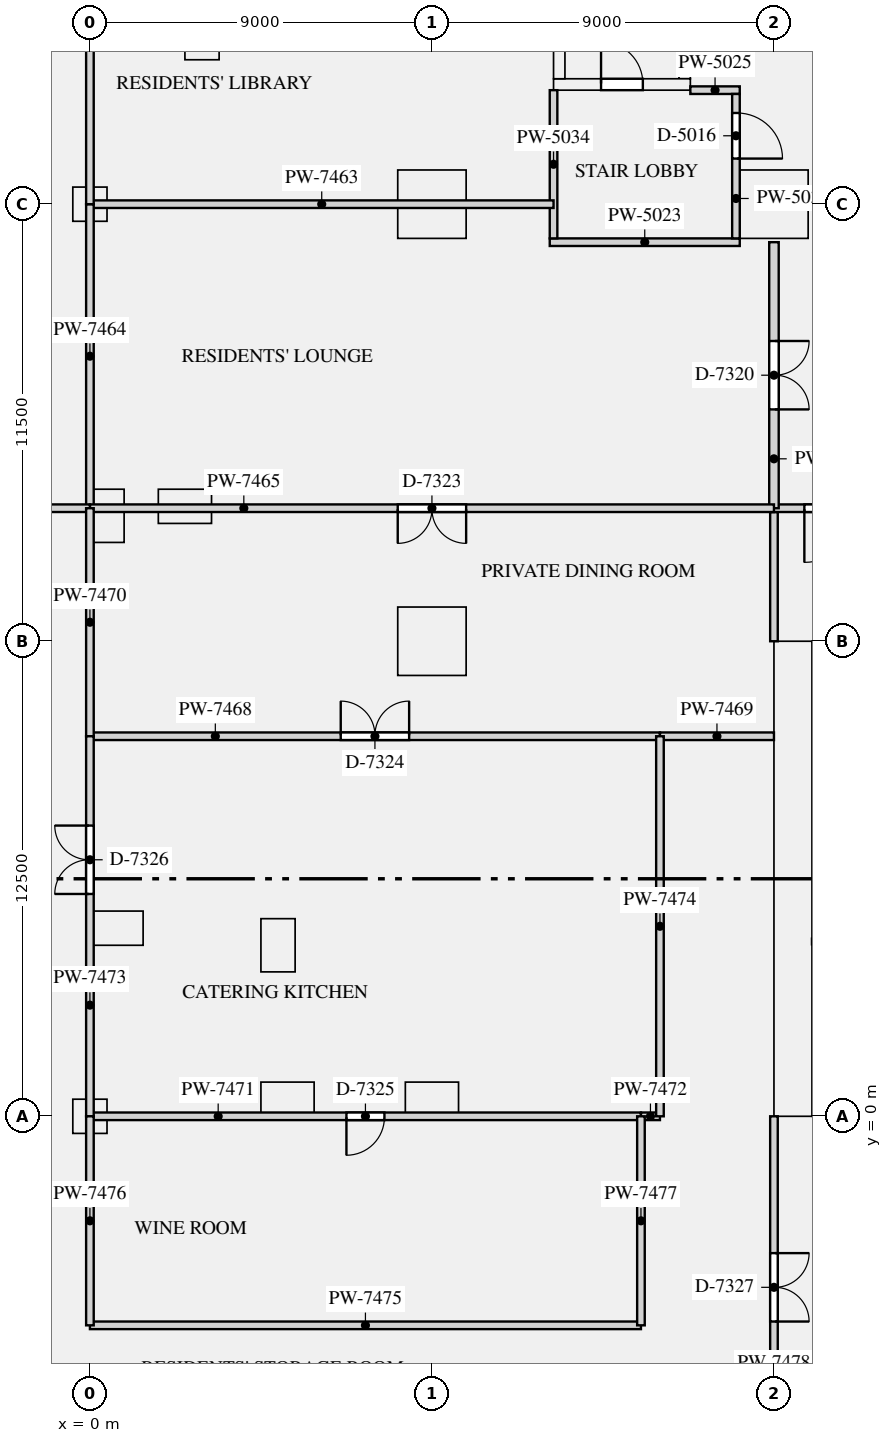
"""IFC4 building model, lengths in metres.
Left out: names, types, materials, properties, quantities, classifications, styles, units other than length and angle.
Written with IfcOpenShell. Run it as: python <this file> out.ifc"""

import sys

from ifc_helpers import new_model, si_unit, direction, frame, frame_2d, origin, origin_with_axes, origin_2d, place, context, subcontext, project, spatial, rectangle, extrude, element, fill, save


model = new_model("IFC4")
c1 = context("Model", 3, precision=1e-05, world=origin(), true_north=direction((0.0, 1.0)))
c2 = subcontext(c1, "Body", "Model", "MODEL_VIEW")
j1 = project(units=[si_unit("LENGTHUNIT", "METRE"), si_unit("PLANEANGLEUNIT", "RADIAN")], contexts=[c1])
p1 = place(None, origin())
s1 = spatial("IfcSite", under=j1, at=p1, CompositionType="ELEMENT")
p2 = place(p1, origin())
s2 = spatial("IfcBuilding", under=s1, at=p2, CompositionType="ELEMENT")
p3 = place(p2, frame((0.0, 0.0, 6.5)))
s3 = spatial("IfcBuildingStorey", under=s2, at=p3, CompositionType="ELEMENT", Elevation=6.5)
for number, where, z_axis, x_axis in (
    (1, (9.0, 0.45, 0.0), (0.0, 0.0, 1.0), (1.0, 0.0, 0.0)),
    (2, (2.95, 28.5, 0.0), (0.0, 0.0, 1.0), (0.0, -1.0, 0.0)),
    (3, (2.5, 16.05, 0.0), (0.0, 0.0, 1.0), (-1.0, 0.0, 0.0)),
    (4, (0.45, 15.8, 0.0), (0.0, 0.0, 1.0), (0.0, -1.0, 0.0)),
    (5, (0.7, 4.95, 0.0), (0.0, 0.0, 1.0), (1.0, 0.0, 0.0)),
    (6, (4.95, 4.5, 0.0), (0.0, 0.0, 1.0), (0.0, -1.0, 0.0)),
    (7, (5.2, 0.45, 0.0), (0.0, 0.0, 1.0), (1.0, 0.0, 0.0)),
):
    element("IfcColumn", number, at=place(p3, frame(where, z_axis=z_axis, x_axis=x_axis)), inside=s3, PredefinedType="USERDEFINED", context=c2, shape_type="SweptSolid", body=[
        extrude(rectangle(XDim=1.4, YDim=0.9, at=origin_2d()), origin(), (0.0, 0.0, 1.0), 4.5),
    ])
for number, where, z_axis, x_axis in (
    (8, (0.0, 0.0, 0.0), (0.0, 0.0, 1.0), (1.0, 0.0, 0.0)),
    (9, (0.0, 24.0, 0.0), (0.0, 0.0, 1.0), (1.0, 0.0, 0.0)),
):
    element("IfcColumn", number, at=place(p3, frame(where, z_axis=z_axis, x_axis=x_axis)), inside=s3, PredefinedType="COLUMN", context=c2, shape_type="SweptSolid", body=[
        extrude(rectangle(XDim=0.9, YDim=0.9, at=origin_2d()), origin(), (0.0, 0.0, 1.0), 4.5),
    ])
for number, where, z_axis, x_axis in (
    (10, (9.0, 12.5, 0.0), (0.0, 0.0, 1.0), (1.0, 0.0, 0.0)),
    (11, (9.0, 24.0, 0.0), (0.0, 0.0, 1.0), (1.0, 0.0, 0.0)),
    (12, (18.0, 24.0, 0.0), (0.0, 0.0, 1.0), (1.0, 0.0, 0.0)),
):
    element("IfcColumn", number, at=place(p3, frame(where, z_axis=z_axis, x_axis=x_axis)), inside=s3, PredefinedType="COLUMN", context=c2, shape_type="SweptSolid", body=[
        extrude(rectangle(XDim=1.8, YDim=1.8, at=origin_2d()), origin(), (0.0, 0.0, 1.0), 4.5),
    ])
p4 = place(p3, frame((18.5, 0.0, 0.0), z_axis=(0.0, 0.0, 1.0), x_axis=(0.0, 1.0, 0.0)))
e13 = element("IfcWall", 13, at=p4, inside=s3, PredefinedType="SHEAR", context=c2, shape_type="SweptSolid", body=[
    extrude(rectangle(XDim=12.5, YDim=1.0, at=frame_2d((6.25, 0.0))), origin(), (0.0, 0.0, 1.0), 4.5),
])
p5 = place(p3, frame((12.2, 27.15, 0.0), z_axis=(0.0, 0.0, 1.0), x_axis=(1.0, 0.0, 0.0)))
e14 = element("IfcWall", 14, at=p5, inside=s3, PredefinedType="SHEAR", context=c2, shape_type="SweptSolid", body=[
    extrude(rectangle(XDim=3.6, YDim=0.3, at=frame_2d((1.8, 0.0))), origin(), (0.0, 0.0, 1.0), 4.5),
])
p6 = place(p5, frame((1.25, 0.0, 0.0)))
e15 = element("IfcOpeningElement", 15, at=p6, cuts=e14, PredefinedType="OPENING", context=c2, shape_type="SweptSolid", body=[
    extrude(rectangle(XDim=1.1, YDim=2.1, at=frame_2d((0.55, 1.05))), frame((0.0, 0.16, 0.0), z_axis=(0.0, -1.0, 0.0), x_axis=(1.0, 0.0, 0.0)), (0.0, 0.0, 1.0), 0.32),
])
for number, where, z_axis, x_axis in (
    (16, (12.35, 27.3, 0.0), (0.0, 0.0, 1.0), (0.0, 1.0, 0.0)),
    (17, (15.65, 27.3, 0.0), (0.0, 0.0, 1.0), (0.0, 1.0, 0.0)),
):
    element("IfcWall", number, at=place(p3, frame(where, z_axis=z_axis, x_axis=x_axis)), inside=s3, PredefinedType="SHEAR", context=c2, shape_type="SweptSolid", body=[
        extrude(rectangle(XDim=7.8, YDim=0.3, at=frame_2d((3.9, 0.0))), origin(), (0.0, 0.0, 1.0), 4.5),
    ])
p7 = place(p3, frame((19.0, 4.6, 0.0), z_axis=(0.0, 0.0, 1.0), x_axis=(1.0, 0.0, 0.0)))
e18 = element("IfcWall", 18, at=p7, inside=s3, PredefinedType="PARTITIONING", context=c2, shape_type="SweptSolid", body=[
    extrude(rectangle(XDim=8.3, YDim=0.15, at=frame_2d((4.15, 0.0))), origin(), (0.0, 0.0, 1.0), 4.098),
])
p8 = place(p7, frame((0.45, 0.0, 0.0)))
e19 = element("IfcOpeningElement", 19, at=p8, cuts=e18, PredefinedType="OPENING", context=c2, shape_type="SweptSolid", body=[
    extrude(rectangle(XDim=0.9, YDim=2.1, at=frame_2d((0.45, 1.05))), frame((0.0, 0.085, 0.0), z_axis=(0.0, -1.0, 0.0), x_axis=(1.0, 0.0, 0.0)), (0.0, 0.0, 1.0), 0.17),
])
p9 = place(p7, frame((5.85, 0.0, 0.0)))
e20 = element("IfcOpeningElement", 20, at=p9, cuts=e18, PredefinedType="OPENING", context=c2, shape_type="SweptSolid", body=[
    extrude(rectangle(XDim=0.9, YDim=2.1, at=frame_2d((0.45, 1.05))), frame((0.0, 0.085, 0.0), z_axis=(0.0, -1.0, 0.0), x_axis=(1.0, 0.0, 0.0)), (0.0, 0.0, 1.0), 0.17),
])
p10 = place(p3, frame((12.1, 23.0, 0.0), z_axis=(0.0, 0.0, 1.0), x_axis=(1.0, 0.0, 0.0)))
e21 = element("IfcWall", 21, at=p10, inside=s3, PredefinedType="PARTITIONING", context=c2, shape_type="SweptSolid", body=[
    extrude(rectangle(XDim=5.0, YDim=0.2, at=frame_2d((2.5, 0.0))), origin(), (0.0, 0.0, 1.0), 4.098),
])
p11 = place(p3, frame((15.8, 27.0, 0.0), z_axis=(0.0, 0.0, 1.0), x_axis=(1.0, 0.0, 0.0)))
e22 = element("IfcWall", 22, at=p11, inside=s3, PredefinedType="PARTITIONING", context=c2, shape_type="SweptSolid", body=[
    extrude(rectangle(XDim=1.3, YDim=0.2, at=frame_2d((0.65, 0.0))), origin(), (0.0, 0.0, 1.0), 4.098),
])
p12 = place(p3, frame((18.0, 12.5, 0.0), z_axis=(0.0, 0.0, 1.0), x_axis=(0.0, 1.0, 0.0)))
e23 = element("IfcWall", 23, at=p12, inside=s3, PredefinedType="PARTITIONING", context=c2, shape_type="SweptSolid", body=[
    extrude(rectangle(XDim=3.4, YDim=0.2, at=frame_2d((1.7, 0.0))), origin(), (0.0, 0.0, 1.0), 4.098),
])
p13 = place(p3, frame((12.2, 23.1, 0.0), z_axis=(0.0, 0.0, 1.0), x_axis=(0.0, 1.0, 0.0)))
e24 = element("IfcWall", 24, at=p13, inside=s3, PredefinedType="PARTITIONING", context=c2, shape_type="SweptSolid", body=[
    extrude(rectangle(XDim=3.9, YDim=0.2, at=frame_2d((1.95, 0.0))), origin(), (0.0, 0.0, 1.0), 4.098),
])
p14 = place(p3, frame((17.0, 23.1, 0.0), z_axis=(0.0, 0.0, 1.0), x_axis=(0.0, 1.0, 0.0)))
e25 = element("IfcWall", 25, at=p14, inside=s3, PredefinedType="PARTITIONING", context=c2, shape_type="SweptSolid", body=[
    extrude(rectangle(XDim=3.8, YDim=0.2, at=frame_2d((1.9, 0.0))), origin(), (0.0, 0.0, 1.0), 4.098),
])
p15 = place(p14, frame((2.1, 0.0, 0.0)))
e26 = element("IfcOpeningElement", 26, at=p15, cuts=e25, PredefinedType="OPENING", context=c2, shape_type="SweptSolid", body=[
    extrude(rectangle(XDim=1.2, YDim=2.1, at=frame_2d((0.6, 1.05))), frame((0.0, 0.11, 0.0), z_axis=(0.0, -1.0, 0.0), x_axis=(1.0, 0.0, 0.0)), (0.0, 0.0, 1.0), 0.22),
])
p16 = place(p3, frame((17.9, 16.0, 0.0), z_axis=(0.0, 0.0, 1.0), x_axis=(1.0, 0.0, 0.0)))
e27 = element("IfcWall", 27, at=p16, inside=s3, PredefinedType="PARTITIONING", context=c2, shape_type="SweptSolid", body=[
    extrude(rectangle(XDim=36.2, YDim=0.2, at=frame_2d((18.1, 0.0))), origin(), (0.0, 0.0, 1.0), 4.098),
])
p17 = place(p16, frame((0.9, 0.0, 0.0)))
e28 = element("IfcOpeningElement", 28, at=p17, cuts=e27, PredefinedType="OPENING", context=c2, shape_type="SweptSolid", body=[
    extrude(rectangle(XDim=1.4, YDim=2.1, at=frame_2d((0.7, 1.05))), frame((0.0, 0.11, 0.0), z_axis=(0.0, -1.0, 0.0), x_axis=(1.0, 0.0, 0.0)), (0.0, 0.0, 1.0), 0.22),
])
p18 = place(p16, frame((33.9, 0.0, 0.0)))
e29 = element("IfcOpeningElement", 29, at=p18, cuts=e27, PredefinedType="OPENING", context=c2, shape_type="SweptSolid", body=[
    extrude(rectangle(XDim=1.4, YDim=2.1, at=frame_2d((0.7, 1.05))), frame((0.0, 0.11, 0.0), z_axis=(0.0, -1.0, 0.0), x_axis=(1.0, 0.0, 0.0)), (0.0, 0.0, 1.0), 0.22),
])
p19 = place(p3, frame((18.0, 16.0, 0.0), z_axis=(0.0, 0.0, 1.0), x_axis=(0.0, 1.0, 0.0)))
e30 = element("IfcWall", 30, at=p19, inside=s3, PredefinedType="PARTITIONING", context=c2, shape_type="SweptSolid", body=[
    extrude(rectangle(XDim=7.0, YDim=0.25, at=frame_2d((3.5, 0.0))), origin(), (0.0, 0.0, 1.0), 4.098),
])
p20 = place(p19, frame((2.6, 0.0, 0.0)))
e31 = element("IfcOpeningElement", 31, at=p20, cuts=e30, PredefinedType="OPENING", context=c2, shape_type="SweptSolid", body=[
    extrude(rectangle(XDim=1.8, YDim=2.4, at=frame_2d((0.9, 1.2))), frame((0.0, 0.135, 0.0), z_axis=(0.0, -1.0, 0.0), x_axis=(1.0, 0.0, 0.0)), (0.0, 0.0, 1.0), 0.27),
])
p21 = place(p3, frame((0.0, 24.0, 0.0), z_axis=(0.0, 0.0, 1.0), x_axis=(1.0, 0.0, 0.0)))
e32 = element("IfcWall", 32, at=p21, inside=s3, PredefinedType="PARTITIONING", context=c2, shape_type="SweptSolid", body=[
    extrude(rectangle(XDim=12.2, YDim=0.2, at=frame_2d((6.1, 0.0))), origin(), (0.0, 0.0, 1.0), 4.098),
])
p22 = place(p3, frame((0.0, 16.0, 0.0), z_axis=(0.0, 0.0, 1.0), x_axis=(0.0, 1.0, 0.0)))
e33 = element("IfcWall", 33, at=p22, inside=s3, PredefinedType="PARTITIONING", context=c2, shape_type="SweptSolid", body=[
    extrude(rectangle(XDim=8.0, YDim=0.2, at=frame_2d((4.0, 0.0))), origin(), (0.0, 0.0, 1.0), 4.098),
])
p23 = place(p3, frame((0.0, 16.0, 0.0), z_axis=(0.0, 0.0, 1.0), x_axis=(1.0, 0.0, 0.0)))
e34 = element("IfcWall", 34, at=p23, inside=s3, PredefinedType="PARTITIONING", context=c2, shape_type="SweptSolid", body=[
    extrude(rectangle(XDim=18.0, YDim=0.2, at=frame_2d((9.0, 0.0))), origin(), (0.0, 0.0, 1.0), 4.098),
])
p24 = place(p23, frame((8.1, 0.0, 0.0)))
e35 = element("IfcOpeningElement", 35, at=p24, cuts=e34, PredefinedType="OPENING", context=c2, shape_type="SweptSolid", body=[
    extrude(rectangle(XDim=1.8, YDim=2.4, at=frame_2d((0.9, 1.2))), frame((0.0, 0.11, 0.0), z_axis=(0.0, -1.0, 0.0), x_axis=(1.0, 0.0, 0.0)), (0.0, 0.0, 1.0), 0.22),
])
p25 = place(p3, frame((0.0, 24.0, 0.0), z_axis=(0.0, 0.0, 1.0), x_axis=(0.0, 1.0, 0.0)))
e36 = element("IfcWall", 36, at=p25, inside=s3, PredefinedType="PARTITIONING", context=c2, shape_type="SweptSolid", body=[
    extrude(rectangle(XDim=11.5, YDim=0.2, at=frame_2d((5.75, 0.0))), origin(), (0.0, 0.0, 1.0), 4.098),
])
p26 = place(p3, frame((-18.0, 16.0, 0.0), z_axis=(0.0, 0.0, 1.0), x_axis=(1.0, 0.0, 0.0)))
e37 = element("IfcWall", 37, at=p26, inside=s3, PredefinedType="PARTITIONING", context=c2, shape_type="SweptSolid", body=[
    extrude(rectangle(XDim=18.0, YDim=0.2, at=frame_2d((9.0, 0.0))), origin(), (0.0, 0.0, 1.0), 4.098),
])
p27 = place(p3, frame((0.0, 10.0, 0.0), z_axis=(0.0, 0.0, 1.0), x_axis=(1.0, 0.0, 0.0)))
e38 = element("IfcWall", 38, at=p27, inside=s3, PredefinedType="PARTITIONING", context=c2, shape_type="SweptSolid", body=[
    extrude(rectangle(XDim=15.0, YDim=0.2, at=frame_2d((7.5, 0.0))), origin(), (0.0, 0.0, 1.0), 4.098),
])
p28 = place(p27, frame((6.6, 0.0, 0.0)))
e39 = element("IfcOpeningElement", 39, at=p28, cuts=e38, PredefinedType="OPENING", context=c2, shape_type="SweptSolid", body=[
    extrude(rectangle(XDim=1.8, YDim=2.4, at=frame_2d((0.9, 1.2))), frame((0.0, 0.11, 0.0), z_axis=(0.0, -1.0, 0.0), x_axis=(1.0, 0.0, 0.0)), (0.0, 0.0, 1.0), 0.22),
])
p29 = place(p3, frame((15.0, 10.0, 0.0), z_axis=(0.0, 0.0, 1.0), x_axis=(1.0, 0.0, 0.0)))
e40 = element("IfcWall", 40, at=p29, inside=s3, PredefinedType="PARTITIONING", context=c2, shape_type="SweptSolid", body=[
    extrude(rectangle(XDim=3.0, YDim=0.2, at=frame_2d((1.5, 0.0))), origin(), (0.0, 0.0, 1.0), 4.098),
])
p30 = place(p3, frame((0.0, 10.0, 0.0), z_axis=(0.0, 0.0, 1.0), x_axis=(0.0, 1.0, 0.0)))
e41 = element("IfcWall", 41, at=p30, inside=s3, PredefinedType="PARTITIONING", context=c2, shape_type="SweptSolid", body=[
    extrude(rectangle(XDim=6.0, YDim=0.2, at=frame_2d((3.0, 0.0))), origin(), (0.0, 0.0, 1.0), 4.098),
])
p31 = place(p3, origin_with_axes())
e42 = element("IfcWall", 42, at=p31, inside=s3, PredefinedType="PARTITIONING", context=c2, shape_type="SweptSolid", body=[
    extrude(rectangle(XDim=14.5, YDim=0.2, at=frame_2d((7.25, 0.0))), origin(), (0.0, 0.0, 1.0), 4.098),
])
p32 = place(p31, frame((6.75, 0.0, 0.0)))
e43 = element("IfcOpeningElement", 43, at=p32, cuts=e42, PredefinedType="OPENING", context=c2, shape_type="SweptSolid", body=[
    extrude(rectangle(XDim=1.0, YDim=2.1, at=frame_2d((0.5, 1.05))), frame((0.0, 0.11, 0.0), z_axis=(0.0, -1.0, 0.0), x_axis=(1.0, 0.0, 0.0)), (0.0, 0.0, 1.0), 0.22),
])
p33 = place(p3, frame((14.5, 0.0, 0.0), z_axis=(0.0, 0.0, 1.0), x_axis=(1.0, 0.0, 0.0)))
e44 = element("IfcWall", 44, at=p33, inside=s3, PredefinedType="PARTITIONING", context=c2, shape_type="SweptSolid", body=[
    extrude(rectangle(XDim=0.5, YDim=0.2, at=frame_2d((0.25, 0.0))), origin(), (0.0, 0.0, 1.0), 4.098),
])
p34 = place(p3, frame((0.0, 0.0, 0.0), z_axis=(0.0, 0.0, 1.0), x_axis=(0.0, 1.0, 0.0)))
e45 = element("IfcWall", 45, at=p34, inside=s3, PredefinedType="PARTITIONING", context=c2, shape_type="SweptSolid", body=[
    extrude(rectangle(XDim=10.0, YDim=0.2, at=frame_2d((5.0, 0.0))), origin(), (0.0, 0.0, 1.0), 4.098),
])
p35 = place(p34, frame((5.85, 0.0, 0.0)))
e46 = element("IfcOpeningElement", 46, at=p35, cuts=e45, PredefinedType="OPENING", context=c2, shape_type="SweptSolid", body=[
    extrude(rectangle(XDim=1.8, YDim=2.4, at=frame_2d((0.9, 1.2))), frame((0.0, 0.11, 0.0), z_axis=(0.0, -1.0, 0.0), x_axis=(1.0, 0.0, 0.0)), (0.0, 0.0, 1.0), 0.22),
])
p36 = place(p3, frame((15.0, 0.0, 0.0), z_axis=(0.0, 0.0, 1.0), x_axis=(0.0, 1.0, 0.0)))
e47 = element("IfcWall", 47, at=p36, inside=s3, PredefinedType="PARTITIONING", context=c2, shape_type="SweptSolid", body=[
    extrude(rectangle(XDim=10.0, YDim=0.2, at=frame_2d((5.0, 0.0))), origin(), (0.0, 0.0, 1.0), 4.098),
])
p37 = place(p3, frame((0.0, -5.5, 0.0), z_axis=(0.0, 0.0, 1.0), x_axis=(1.0, 0.0, 0.0)))
e48 = element("IfcWall", 48, at=p37, inside=s3, PredefinedType="PARTITIONING", context=c2, shape_type="SweptSolid", body=[
    extrude(rectangle(XDim=14.5, YDim=0.2, at=frame_2d((7.25, 0.0))), origin(), (0.0, 0.0, 1.0), 4.098),
])
for number, where, z_axis, x_axis in (
    (49, (0.0, -5.5, 0.0), (0.0, 0.0, 1.0), (0.0, 1.0, 0.0)),
    (50, (14.5, -5.5, 0.0), (0.0, 0.0, 1.0), (0.0, 1.0, 0.0)),
):
    element("IfcWall", number, at=place(p3, frame(where, z_axis=z_axis, x_axis=x_axis)), inside=s3, PredefinedType="PARTITIONING", context=c2, shape_type="SweptSolid", body=[
        extrude(rectangle(XDim=5.5, YDim=0.2, at=frame_2d((2.75, 0.0))), origin(), (0.0, 0.0, 1.0), 4.098),
    ])
p38 = place(p3, frame((18.0, -9.0, 0.0), z_axis=(0.0, 0.0, 1.0), x_axis=(0.0, 1.0, 0.0)))
e51 = element("IfcWall", 51, at=p38, inside=s3, PredefinedType="PARTITIONING", context=c2, shape_type="SweptSolid", body=[
    extrude(rectangle(XDim=9.0, YDim=0.2, at=frame_2d((4.5, 0.0))), origin(), (0.0, 0.0, 1.0), 4.098),
])
p39 = place(p38, frame((3.6, 0.0, 0.0)))
e52 = element("IfcOpeningElement", 52, at=p39, cuts=e51, PredefinedType="OPENING", context=c2, shape_type="SweptSolid", body=[
    extrude(rectangle(XDim=1.8, YDim=2.4, at=frame_2d((0.9, 1.2))), frame((0.0, 0.11, 0.0), z_axis=(0.0, -1.0, 0.0), x_axis=(1.0, 0.0, 0.0)), (0.0, 0.0, 1.0), 0.22),
])
p40 = place(p6, origin())
e53 = element("IfcDoor", 53, at=p40, inside=s3, OperationType="SINGLE_SWING_LEFT", PredefinedType="DOOR", context=c2, shape_type="SweptSolid", body=[
    extrude(rectangle(XDim=1.1, YDim=2.1, at=frame_2d((0.55, 1.05))), frame((0.0, 0.025, 0.0), z_axis=(0.0, -1.0, 0.0), x_axis=(1.0, 0.0, 0.0)), (0.0, 0.0, 1.0), 0.05),
])
fill(e15, e53)
p41 = place(p15, frame((1.2, 0.0, 0.0), z_axis=(0.0, 0.0, 1.0), x_axis=(-1.0, 0.0, 0.0)))
e54 = element("IfcDoor", 54, at=p41, inside=s3, OperationType="SINGLE_SWING_RIGHT", PredefinedType="DOOR", context=c2, shape_type="SweptSolid", body=[
    extrude(rectangle(XDim=1.2, YDim=2.1, at=frame_2d((0.6, 1.05))), frame((0.0, 0.025, 0.0), z_axis=(0.0, -1.0, 0.0), x_axis=(1.0, 0.0, 0.0)), (0.0, 0.0, 1.0), 0.05),
])
fill(e26, e54)
p42 = place(p17, frame((1.4, 0.0, 0.0), z_axis=(0.0, 0.0, 1.0), x_axis=(-1.0, 0.0, 0.0)))
e55 = element("IfcDoor", 55, at=p42, inside=s3, OperationType="SINGLE_SWING_RIGHT", PredefinedType="DOOR", context=c2, shape_type="SweptSolid", body=[
    extrude(rectangle(XDim=1.4, YDim=2.1, at=frame_2d((0.7, 1.05))), frame((0.0, 0.025, 0.0), z_axis=(0.0, -1.0, 0.0), x_axis=(1.0, 0.0, 0.0)), (0.0, 0.0, 1.0), 0.05),
])
fill(e28, e55)
p43 = place(p20, frame((1.8, 0.0, 0.0), z_axis=(0.0, 0.0, 1.0), x_axis=(-1.0, 0.0, 0.0)))
e56 = element("IfcDoor", 56, at=p43, inside=s3, OperationType="DOUBLE_DOOR_SINGLE_SWING", PredefinedType="DOOR", context=c2, shape_type="SweptSolid", body=[
    extrude(rectangle(XDim=1.8, YDim=2.4, at=frame_2d((0.9, 1.2))), frame((0.0, 0.025, 0.0), z_axis=(0.0, -1.0, 0.0), x_axis=(1.0, 0.0, 0.0)), (0.0, 0.0, 1.0), 0.05),
])
fill(e31, e56)
p44 = place(p24, frame((1.8, 0.0, 0.0), z_axis=(0.0, 0.0, 1.0), x_axis=(-1.0, 0.0, 0.0)))
e57 = element("IfcDoor", 57, at=p44, inside=s3, OperationType="DOUBLE_DOOR_SINGLE_SWING", PredefinedType="DOOR", context=c2, shape_type="SweptSolid", body=[
    extrude(rectangle(XDim=1.8, YDim=2.4, at=frame_2d((0.9, 1.2))), frame((0.0, 0.025, 0.0), z_axis=(0.0, -1.0, 0.0), x_axis=(1.0, 0.0, 0.0)), (0.0, 0.0, 1.0), 0.05),
])
fill(e35, e57)
p45 = place(p28, origin())
e58 = element("IfcDoor", 58, at=p45, inside=s3, OperationType="DOUBLE_DOOR_SINGLE_SWING", PredefinedType="DOOR", context=c2, shape_type="SweptSolid", body=[
    extrude(rectangle(XDim=1.8, YDim=2.4, at=frame_2d((0.9, 1.2))), frame((0.0, 0.025, 0.0), z_axis=(0.0, -1.0, 0.0), x_axis=(1.0, 0.0, 0.0)), (0.0, 0.0, 1.0), 0.05),
])
fill(e39, e58)
p46 = place(p32, frame((1.0, 0.0, 0.0), z_axis=(0.0, 0.0, 1.0), x_axis=(-1.0, 0.0, 0.0)))
e59 = element("IfcDoor", 59, at=p46, inside=s3, OperationType="SINGLE_SWING_RIGHT", PredefinedType="DOOR", context=c2, shape_type="SweptSolid", body=[
    extrude(rectangle(XDim=1.0, YDim=2.1, at=frame_2d((0.5, 1.05))), frame((0.0, 0.025, 0.0), z_axis=(0.0, -1.0, 0.0), x_axis=(1.0, 0.0, 0.0)), (0.0, 0.0, 1.0), 0.05),
])
fill(e43, e59)
p47 = place(p35, origin())
e60 = element("IfcDoor", 60, at=p47, inside=s3, OperationType="DOUBLE_DOOR_SINGLE_SWING", PredefinedType="DOOR", context=c2, shape_type="SweptSolid", body=[
    extrude(rectangle(XDim=1.8, YDim=2.4, at=frame_2d((0.9, 1.2))), frame((0.0, 0.025, 0.0), z_axis=(0.0, -1.0, 0.0), x_axis=(1.0, 0.0, 0.0)), (0.0, 0.0, 1.0), 0.05),
])
fill(e46, e60)
p48 = place(p39, frame((1.8, 0.0, 0.0), z_axis=(0.0, 0.0, 1.0), x_axis=(-1.0, 0.0, 0.0)))
e61 = element("IfcDoor", 61, at=p48, inside=s3, OperationType="DOUBLE_DOOR_SINGLE_SWING", PredefinedType="DOOR", context=c2, shape_type="SweptSolid", body=[
    extrude(rectangle(XDim=1.8, YDim=2.4, at=frame_2d((0.9, 1.2))), frame((0.0, 0.025, 0.0), z_axis=(0.0, -1.0, 0.0), x_axis=(1.0, 0.0, 0.0)), (0.0, 0.0, 1.0), 0.05),
])
fill(e52, e61)
save(model, sys.argv[1])
